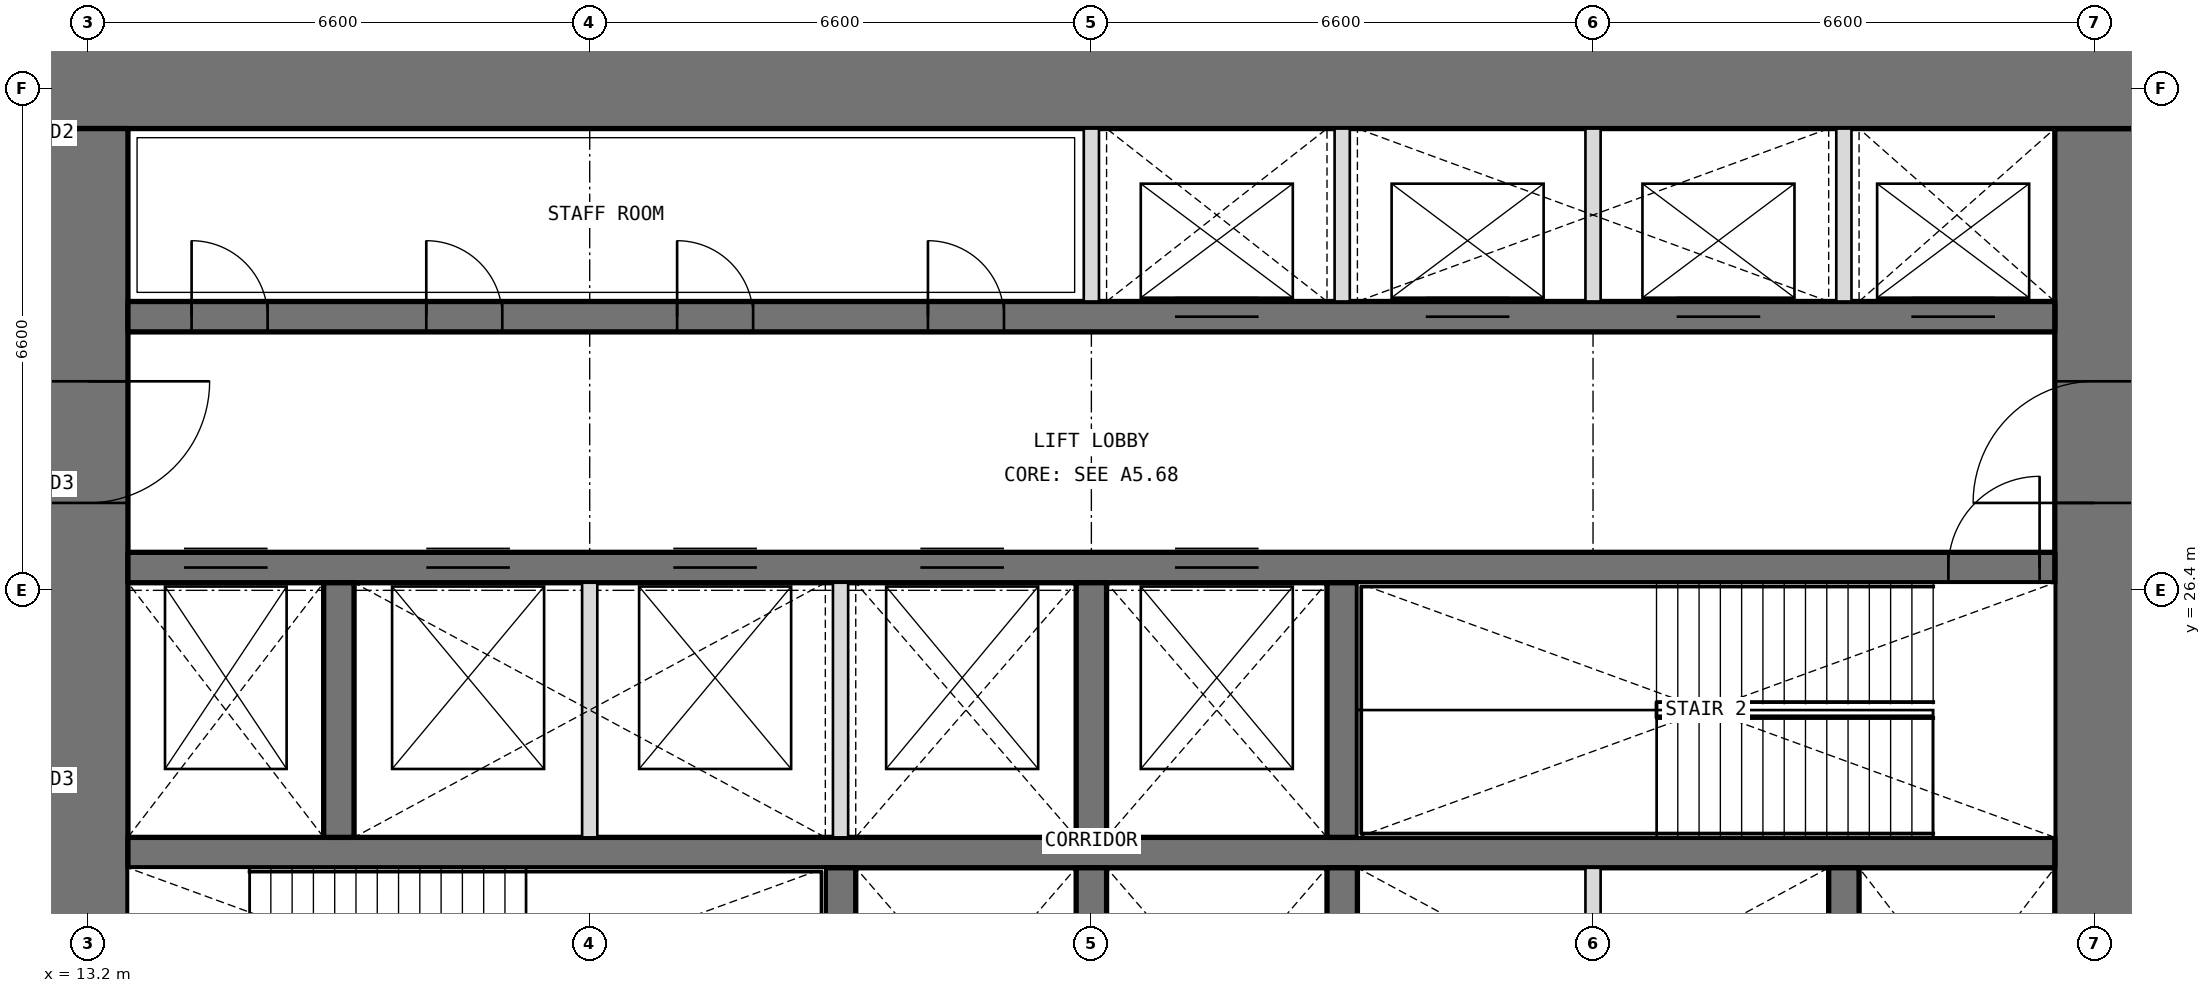
"""IFC4 building model, lengths in metres.
Left out: names, types, materials, properties, quantities, classifications, styles, units other than length and angle.
Written with IfcOpenShell. Run it as: python <this file> out.ifc"""

import sys

from ifc_helpers import new_model, si_unit, direction, frame, frame_2d, origin, place, context, subcontext, project, spatial, rectangle, extrude, element, fill, save


model = new_model("IFC4")
c1 = context("Model", 3, precision=1e-05, world=origin(), true_north=direction((0.0, 1.0)))
c2 = subcontext(c1, "Body", "Model", "MODEL_VIEW")
j1 = project(units=[si_unit("LENGTHUNIT", "METRE"), si_unit("PLANEANGLEUNIT", "RADIAN")], contexts=[c1])
p1 = place(None, origin())
s1 = spatial("IfcSite", under=j1, at=p1, CompositionType="ELEMENT")
p2 = place(p1, origin())
s2 = spatial("IfcBuilding", under=s1, at=p2, CompositionType="ELEMENT")
p3 = place(p2, frame((0.0, 0.0, 288.0)))
s3 = spatial("IfcBuildingStorey", under=s2, at=p3, CompositionType="ELEMENT", Elevation=288.0)
p4 = place(p3, frame((39.6, 13.725, 0.0), z_axis=(0.0, 0.0, 1.0), x_axis=(0.0, 1.0, 0.0)))
e1 = element("IfcWall", 1, at=p4, inside=s3, PredefinedType="SHEAR", context=c2, shape_type="SweptSolid", body=[
    extrude(rectangle(XDim=18.75, YDim=1.05, at=frame_2d((9.375, 0.0))), origin(), (0.0, 0.0, 1.0), 4.8),
])
p5 = place(p4, frame((3.025, 0.0, 0.0)))
e2 = element("IfcOpeningElement", 2, at=p5, cuts=e1, PredefinedType="OPENING", context=c2, shape_type="SweptSolid", body=[
    extrude(rectangle(XDim=1.6, YDim=2.1, at=frame_2d((0.8, 1.05))), frame((0.0, 0.535, 0.0), z_axis=(0.0, -1.0, 0.0), x_axis=(1.0, 0.0, 0.0)), (0.0, 0.0, 1.0), 1.07),
])
p6 = place(p4, frame((13.825, 0.0, 0.0)))
e3 = element("IfcOpeningElement", 3, at=p6, cuts=e1, PredefinedType="OPENING", context=c2, shape_type="SweptSolid", body=[
    extrude(rectangle(XDim=1.6, YDim=2.1, at=frame_2d((0.8, 1.05))), frame((0.0, 0.535, 0.0), z_axis=(0.0, -1.0, 0.0), x_axis=(1.0, 0.0, 0.0)), (0.0, 0.0, 1.0), 1.07),
])
p7 = place(p3, frame((40.125, 33.0, 0.0), z_axis=(0.0, 0.0, 1.0), x_axis=(-1.0, 0.0, 0.0)))
e4 = element("IfcWall", 4, at=p7, inside=s3, PredefinedType="SHEAR", context=c2, shape_type="SweptSolid", body=[
    extrude(rectangle(XDim=27.45, YDim=1.05, at=frame_2d((13.725, 0.0))), origin(), (0.0, 0.0, 1.0), 4.8),
])
p8 = place(p3, frame((13.2, 32.475, 0.0), z_axis=(0.0, 0.0, 1.0), x_axis=(0.0, -1.0, 0.0)))
e5 = element("IfcWall", 5, at=p8, inside=s3, PredefinedType="SHEAR", context=c2, shape_type="SweptSolid", body=[
    extrude(rectangle(XDim=18.75, YDim=1.05, at=frame_2d((9.375, 0.0))), origin(), (0.0, 0.0, 1.0), 4.8),
])
p9 = place(p8, frame((14.125, 0.0, 0.0)))
e6 = element("IfcOpeningElement", 6, at=p9, cuts=e5, PredefinedType="OPENING", context=c2, shape_type="SweptSolid", body=[
    extrude(rectangle(XDim=1.6, YDim=2.1, at=frame_2d((0.8, 1.05))), frame((0.0, 0.535, 0.0), z_axis=(0.0, -1.0, 0.0), x_axis=(1.0, 0.0, 0.0)), (0.0, 0.0, 1.0), 1.07),
])
p10 = place(p8, frame((3.325, 0.0, 0.0)))
e7 = element("IfcOpeningElement", 7, at=p10, cuts=e5, PredefinedType="OPENING", context=c2, shape_type="SweptSolid", body=[
    extrude(rectangle(XDim=1.6, YDim=2.1, at=frame_2d((0.8, 1.05))), frame((0.0, 0.535, 0.0), z_axis=(0.0, -1.0, 0.0), x_axis=(1.0, 0.0, 0.0)), (0.0, 0.0, 1.0), 1.07),
])
p11 = place(p3, frame((13.725, 22.95, 0.0), z_axis=(0.0, 0.0, 1.0), x_axis=(1.0, 0.0, 0.0)))
e8 = element("IfcWall", 8, at=p11, inside=s3, PredefinedType="SHEAR", context=c2, shape_type="SweptSolid", body=[
    extrude(rectangle(XDim=25.35, YDim=0.4, at=frame_2d((12.675, 0.0))), origin(), (0.0, 0.0, 1.0), 4.8),
])
p12 = place(p3, frame((13.725, 26.7, 0.0), z_axis=(0.0, 0.0, 1.0), x_axis=(1.0, 0.0, 0.0)))
e9 = element("IfcWall", 9, at=p12, inside=s3, PredefinedType="SHEAR", context=c2, shape_type="SweptSolid", body=[
    extrude(rectangle(XDim=25.35, YDim=0.4, at=frame_2d((12.675, 0.0))), origin(), (0.0, 0.0, 1.0), 4.8),
])
p13 = place(p12, frame((23.95, 0.0, 0.0)))
e10 = element("IfcOpeningElement", 10, at=p13, cuts=e9, PredefinedType="OPENING", context=c2, shape_type="SweptSolid", body=[
    extrude(rectangle(XDim=1.2, YDim=2.1, at=frame_2d((0.6, 1.05))), frame((0.0, 0.21, 0.0), z_axis=(0.0, -1.0, 0.0), x_axis=(1.0, 0.0, 0.0)), (0.0, 0.0, 1.0), 0.42),
])
p14 = place(p12, frame((0.738, 0.0, 0.0)))
e11 = element("IfcOpeningElement", 11, at=p14, cuts=e9, PredefinedType="OPENING", context=c2, shape_type="SweptSolid", body=[
    extrude(rectangle(XDim=1.1, YDim=2.1, at=frame_2d((0.55, 1.05))), frame((0.0, 0.21, 0.0), z_axis=(0.0, -1.0, 0.0), x_axis=(1.0, 0.0, 0.0)), (0.0, 0.0, 1.0), 0.42),
])
p15 = place(p12, frame((3.925, 0.0, 0.0)))
e12 = element("IfcOpeningElement", 12, at=p15, cuts=e9, PredefinedType="OPENING", context=c2, shape_type="SweptSolid", body=[
    extrude(rectangle(XDim=1.1, YDim=2.1, at=frame_2d((0.55, 1.05))), frame((0.0, 0.21, 0.0), z_axis=(0.0, -1.0, 0.0), x_axis=(1.0, 0.0, 0.0)), (0.0, 0.0, 1.0), 0.42),
])
p16 = place(p12, frame((7.175, 0.0, 0.0)))
e13 = element("IfcOpeningElement", 13, at=p16, cuts=e9, PredefinedType="OPENING", context=c2, shape_type="SweptSolid", body=[
    extrude(rectangle(XDim=1.1, YDim=2.1, at=frame_2d((0.55, 1.05))), frame((0.0, 0.21, 0.0), z_axis=(0.0, -1.0, 0.0), x_axis=(1.0, 0.0, 0.0)), (0.0, 0.0, 1.0), 0.42),
])
p17 = place(p12, frame((10.425, 0.0, 0.0)))
e14 = element("IfcOpeningElement", 14, at=p17, cuts=e9, PredefinedType="OPENING", context=c2, shape_type="SweptSolid", body=[
    extrude(rectangle(XDim=1.1, YDim=2.1, at=frame_2d((0.55, 1.05))), frame((0.0, 0.21, 0.0), z_axis=(0.0, -1.0, 0.0), x_axis=(1.0, 0.0, 0.0)), (0.0, 0.0, 1.0), 0.42),
])
p18 = place(p12, frame((13.775, 0.0, 0.0)))
e15 = element("IfcOpeningElement", 15, at=p18, cuts=e9, PredefinedType="OPENING", context=c2, shape_type="SweptSolid", body=[
    extrude(rectangle(XDim=1.1, YDim=2.1, at=frame_2d((0.55, 1.05))), frame((0.0, 0.21, 0.0), z_axis=(0.0, -1.0, 0.0), x_axis=(1.0, 0.0, 0.0)), (0.0, 0.0, 1.0), 0.42),
])
p19 = place(p3, frame((13.725, 30.0, 0.0), z_axis=(0.0, 0.0, 1.0), x_axis=(1.0, 0.0, 0.0)))
e16 = element("IfcWall", 16, at=p19, inside=s3, PredefinedType="SHEAR", context=c2, shape_type="SweptSolid", body=[
    extrude(rectangle(XDim=25.35, YDim=0.4, at=frame_2d((12.675, 0.0))), origin(), (0.0, 0.0, 1.0), 4.8),
])
p20 = place(p19, frame((0.837, 0.0, 0.0)))
e17 = element("IfcOpeningElement", 17, at=p20, cuts=e16, PredefinedType="OPENING", context=c2, shape_type="SweptSolid", body=[
    extrude(rectangle(XDim=1.0, YDim=2.1, at=frame_2d((0.5, 1.05))), frame((0.0, 0.21, 0.0), z_axis=(0.0, -1.0, 0.0), x_axis=(1.0, 0.0, 0.0)), (0.0, 0.0, 1.0), 0.42),
])
p21 = place(p19, frame((3.925, 0.0, 0.0)))
e18 = element("IfcOpeningElement", 18, at=p21, cuts=e16, PredefinedType="OPENING", context=c2, shape_type="SweptSolid", body=[
    extrude(rectangle(XDim=1.0, YDim=2.1, at=frame_2d((0.5, 1.05))), frame((0.0, 0.21, 0.0), z_axis=(0.0, -1.0, 0.0), x_axis=(1.0, 0.0, 0.0)), (0.0, 0.0, 1.0), 0.42),
])
p22 = place(p19, frame((7.225, 0.0, 0.0)))
e19 = element("IfcOpeningElement", 19, at=p22, cuts=e16, PredefinedType="OPENING", context=c2, shape_type="SweptSolid", body=[
    extrude(rectangle(XDim=1.0, YDim=2.1, at=frame_2d((0.5, 1.05))), frame((0.0, 0.21, 0.0), z_axis=(0.0, -1.0, 0.0), x_axis=(1.0, 0.0, 0.0)), (0.0, 0.0, 1.0), 0.42),
])
p23 = place(p19, frame((10.525, 0.0, 0.0)))
e20 = element("IfcOpeningElement", 20, at=p23, cuts=e16, PredefinedType="OPENING", context=c2, shape_type="SweptSolid", body=[
    extrude(rectangle(XDim=1.0, YDim=2.1, at=frame_2d((0.5, 1.05))), frame((0.0, 0.21, 0.0), z_axis=(0.0, -1.0, 0.0), x_axis=(1.0, 0.0, 0.0)), (0.0, 0.0, 1.0), 0.42),
])
p24 = place(p19, frame((13.775, 0.0, 0.0)))
e21 = element("IfcOpeningElement", 21, at=p24, cuts=e16, PredefinedType="OPENING", context=c2, shape_type="SweptSolid", body=[
    extrude(rectangle(XDim=1.1, YDim=2.1, at=frame_2d((0.55, 1.05))), frame((0.0, 0.21, 0.0), z_axis=(0.0, -1.0, 0.0), x_axis=(1.0, 0.0, 0.0)), (0.0, 0.0, 1.0), 0.42),
])
p25 = place(p19, frame((17.075, 0.0, 0.0)))
e22 = element("IfcOpeningElement", 22, at=p25, cuts=e16, PredefinedType="OPENING", context=c2, shape_type="SweptSolid", body=[
    extrude(rectangle(XDim=1.1, YDim=2.1, at=frame_2d((0.55, 1.05))), frame((0.0, 0.21, 0.0), z_axis=(0.0, -1.0, 0.0), x_axis=(1.0, 0.0, 0.0)), (0.0, 0.0, 1.0), 0.42),
])
p26 = place(p19, frame((20.375, 0.0, 0.0)))
e23 = element("IfcOpeningElement", 23, at=p26, cuts=e16, PredefinedType="OPENING", context=c2, shape_type="SweptSolid", body=[
    extrude(rectangle(XDim=1.1, YDim=2.1, at=frame_2d((0.55, 1.05))), frame((0.0, 0.21, 0.0), z_axis=(0.0, -1.0, 0.0), x_axis=(1.0, 0.0, 0.0)), (0.0, 0.0, 1.0), 0.42),
])
p27 = place(p19, frame((23.462, 0.0, 0.0)))
e24 = element("IfcOpeningElement", 24, at=p27, cuts=e16, PredefinedType="OPENING", context=c2, shape_type="SweptSolid", body=[
    extrude(rectangle(XDim=1.1, YDim=2.1, at=frame_2d((0.55, 1.05))), frame((0.0, 0.21, 0.0), z_axis=(0.0, -1.0, 0.0), x_axis=(1.0, 0.0, 0.0)), (0.0, 0.0, 1.0), 0.42),
])
for number, where, z_axis, x_axis in (
    (25, (23.1, 19.4, 0.0), (0.0, 0.0, 1.0), (0.0, 1.0, 0.0)),
    (26, (26.4, 19.4, 0.0), (0.0, 0.0, 1.0), (0.0, 1.0, 0.0)),
    (27, (29.7, 19.4, 0.0), (0.0, 0.0, 1.0), (0.0, 1.0, 0.0)),
    (28, (36.3, 19.4, 0.0), (0.0, 0.0, 1.0), (0.0, 1.0, 0.0)),
    (29, (16.5, 23.15, 0.0), (0.0, 0.0, 1.0), (0.0, 1.0, 0.0)),
    (30, (26.4, 23.15, 0.0), (0.0, 0.0, 1.0), (0.0, 1.0, 0.0)),
    (31, (29.7, 23.15, 0.0), (0.0, 0.0, 1.0), (0.0, 1.0, 0.0)),
):
    element("IfcWall", number, at=place(p3, frame(where, z_axis=z_axis, x_axis=x_axis)), inside=s3, PredefinedType="SHEAR", context=c2, shape_type="SweptSolid", body=[
        extrude(rectangle(XDim=3.35, YDim=0.4, at=frame_2d((1.675, 0.0))), origin(), (0.0, 0.0, 1.0), 4.8),
    ])
for number, where, z_axis, x_axis in (
    (32, (26.4, 30.2, 0.0), (0.0, 0.0, 1.0), (0.0, 1.0, 0.0)),
    (33, (29.7, 30.2, 0.0), (0.0, 0.0, 1.0), (0.0, 1.0, 0.0)),
    (34, (33.0, 30.2, 0.0), (0.0, 0.0, 1.0), (0.0, 1.0, 0.0)),
    (35, (36.3, 30.2, 0.0), (0.0, 0.0, 1.0), (0.0, 1.0, 0.0)),
):
    element("IfcWall", number, at=place(p3, frame(where, z_axis=z_axis, x_axis=x_axis)), inside=s3, PredefinedType="PARTITIONING", context=c2, shape_type="SweptSolid", body=[
        extrude(rectangle(XDim=2.275, YDim=0.2, at=frame_2d((1.138, 0.0))), origin(), (0.0, 0.0, 1.0), 4.8),
    ])
for number, where, z_axis, x_axis in (
    (36, (33.0, 19.4, 0.0), (0.0, 0.0, 1.0), (0.0, 1.0, 0.0)),
    (37, (19.8, 23.15, 0.0), (0.0, 0.0, 1.0), (0.0, 1.0, 0.0)),
    (38, (23.1, 23.15, 0.0), (0.0, 0.0, 1.0), (0.0, 1.0, 0.0)),
):
    element("IfcWall", number, at=place(p3, frame(where, z_axis=z_axis, x_axis=x_axis)), inside=s3, PredefinedType="PARTITIONING", context=c2, shape_type="SweptSolid", body=[
        extrude(rectangle(XDim=3.35, YDim=0.2, at=frame_2d((1.675, 0.0))), origin(), (0.0, 0.0, 1.0), 4.8),
    ])
p28 = place(p20, origin())
e39 = element("IfcDoor", 39, at=p28, inside=s3, OperationType="SINGLE_SWING_LEFT", PredefinedType="DOOR", context=c2, shape_type="SweptSolid", body=[
    extrude(rectangle(XDim=1.0, YDim=2.1, at=frame_2d((0.5, 1.05))), frame((0.0, 0.025, 0.0), z_axis=(0.0, -1.0, 0.0), x_axis=(1.0, 0.0, 0.0)), (0.0, 0.0, 1.0), 0.05),
])
fill(e17, e39)
p29 = place(p21, origin())
e40 = element("IfcDoor", 40, at=p29, inside=s3, OperationType="SINGLE_SWING_LEFT", PredefinedType="DOOR", context=c2, shape_type="SweptSolid", body=[
    extrude(rectangle(XDim=1.0, YDim=2.1, at=frame_2d((0.5, 1.05))), frame((0.0, 0.025, 0.0), z_axis=(0.0, -1.0, 0.0), x_axis=(1.0, 0.0, 0.0)), (0.0, 0.0, 1.0), 0.05),
])
fill(e18, e40)
p30 = place(p22, origin())
e41 = element("IfcDoor", 41, at=p30, inside=s3, OperationType="SINGLE_SWING_LEFT", PredefinedType="DOOR", context=c2, shape_type="SweptSolid", body=[
    extrude(rectangle(XDim=1.0, YDim=2.1, at=frame_2d((0.5, 1.05))), frame((0.0, 0.025, 0.0), z_axis=(0.0, -1.0, 0.0), x_axis=(1.0, 0.0, 0.0)), (0.0, 0.0, 1.0), 0.05),
])
fill(e19, e41)
p31 = place(p23, origin())
e42 = element("IfcDoor", 42, at=p31, inside=s3, OperationType="SINGLE_SWING_LEFT", PredefinedType="DOOR", context=c2, shape_type="SweptSolid", body=[
    extrude(rectangle(XDim=1.0, YDim=2.1, at=frame_2d((0.5, 1.05))), frame((0.0, 0.025, 0.0), z_axis=(0.0, -1.0, 0.0), x_axis=(1.0, 0.0, 0.0)), (0.0, 0.0, 1.0), 0.05),
])
fill(e20, e42)
p32 = place(p13, origin())
e43 = element("IfcDoor", 43, at=p32, inside=s3, OperationType="SINGLE_SWING_RIGHT", PredefinedType="DOOR", context=c2, shape_type="SweptSolid", body=[
    extrude(rectangle(XDim=1.2, YDim=2.1, at=frame_2d((0.6, 1.05))), frame((0.0, 0.025, 0.0), z_axis=(0.0, -1.0, 0.0), x_axis=(1.0, 0.0, 0.0)), (0.0, 0.0, 1.0), 0.05),
])
fill(e10, e43)
p33 = place(p10, origin())
e44 = element("IfcDoor", 44, at=p33, inside=s3, OperationType="DOUBLE_DOOR_DOUBLE_SWING", PredefinedType="DOOR", context=c2, shape_type="SweptSolid", body=[
    extrude(rectangle(XDim=1.6, YDim=2.1, at=frame_2d((0.8, 1.05))), frame((0.0, 0.025, 0.0), z_axis=(0.0, -1.0, 0.0), x_axis=(1.0, 0.0, 0.0)), (0.0, 0.0, 1.0), 0.05),
])
fill(e7, e44)
p34 = place(p6, origin())
e45 = element("IfcDoor", 45, at=p34, inside=s3, OperationType="DOUBLE_DOOR_DOUBLE_SWING", PredefinedType="DOOR", context=c2, shape_type="SweptSolid", body=[
    extrude(rectangle(XDim=1.6, YDim=2.1, at=frame_2d((0.8, 1.05))), frame((0.0, 0.025, 0.0), z_axis=(0.0, -1.0, 0.0), x_axis=(1.0, 0.0, 0.0)), (0.0, 0.0, 1.0), 0.05),
])
fill(e3, e45)
p35 = place(p24, origin())
e46 = element("IfcDoor", 46, at=p35, inside=s3, OperationType="DOUBLE_DOOR_SLIDING", PredefinedType="DOOR", context=c2, shape_type="SweptSolid", body=[
    extrude(rectangle(XDim=1.1, YDim=2.1, at=frame_2d((0.55, 1.05))), frame((0.0, 0.025, 0.0), z_axis=(0.0, -1.0, 0.0), x_axis=(1.0, 0.0, 0.0)), (0.0, 0.0, 1.0), 0.05),
])
fill(e21, e46)
p36 = place(p25, origin())
e47 = element("IfcDoor", 47, at=p36, inside=s3, OperationType="DOUBLE_DOOR_SLIDING", PredefinedType="DOOR", context=c2, shape_type="SweptSolid", body=[
    extrude(rectangle(XDim=1.1, YDim=2.1, at=frame_2d((0.55, 1.05))), frame((0.0, 0.025, 0.0), z_axis=(0.0, -1.0, 0.0), x_axis=(1.0, 0.0, 0.0)), (0.0, 0.0, 1.0), 0.05),
])
fill(e22, e47)
p37 = place(p26, origin())
e48 = element("IfcDoor", 48, at=p37, inside=s3, OperationType="DOUBLE_DOOR_SLIDING", PredefinedType="DOOR", context=c2, shape_type="SweptSolid", body=[
    extrude(rectangle(XDim=1.1, YDim=2.1, at=frame_2d((0.55, 1.05))), frame((0.0, 0.025, 0.0), z_axis=(0.0, -1.0, 0.0), x_axis=(1.0, 0.0, 0.0)), (0.0, 0.0, 1.0), 0.05),
])
fill(e23, e48)
p38 = place(p27, origin())
e49 = element("IfcDoor", 49, at=p38, inside=s3, OperationType="DOUBLE_DOOR_SLIDING", PredefinedType="DOOR", context=c2, shape_type="SweptSolid", body=[
    extrude(rectangle(XDim=1.1, YDim=2.1, at=frame_2d((0.55, 1.05))), frame((0.0, 0.025, 0.0), z_axis=(0.0, -1.0, 0.0), x_axis=(1.0, 0.0, 0.0)), (0.0, 0.0, 1.0), 0.05),
])
fill(e24, e49)
p39 = place(p14, origin())
e50 = element("IfcDoor", 50, at=p39, inside=s3, OperationType="DOUBLE_DOOR_SLIDING", PredefinedType="DOOR", context=c2, shape_type="SweptSolid", body=[
    extrude(rectangle(XDim=1.1, YDim=2.1, at=frame_2d((0.55, 1.05))), frame((0.0, 0.025, 0.0), z_axis=(0.0, -1.0, 0.0), x_axis=(1.0, 0.0, 0.0)), (0.0, 0.0, 1.0), 0.05),
])
fill(e11, e50)
p40 = place(p15, origin())
e51 = element("IfcDoor", 51, at=p40, inside=s3, OperationType="DOUBLE_DOOR_SLIDING", PredefinedType="DOOR", context=c2, shape_type="SweptSolid", body=[
    extrude(rectangle(XDim=1.1, YDim=2.1, at=frame_2d((0.55, 1.05))), frame((0.0, 0.025, 0.0), z_axis=(0.0, -1.0, 0.0), x_axis=(1.0, 0.0, 0.0)), (0.0, 0.0, 1.0), 0.05),
])
fill(e12, e51)
p41 = place(p16, origin())
e52 = element("IfcDoor", 52, at=p41, inside=s3, OperationType="DOUBLE_DOOR_SLIDING", PredefinedType="DOOR", context=c2, shape_type="SweptSolid", body=[
    extrude(rectangle(XDim=1.1, YDim=2.1, at=frame_2d((0.55, 1.05))), frame((0.0, 0.025, 0.0), z_axis=(0.0, -1.0, 0.0), x_axis=(1.0, 0.0, 0.0)), (0.0, 0.0, 1.0), 0.05),
])
fill(e13, e52)
p42 = place(p17, origin())
e53 = element("IfcDoor", 53, at=p42, inside=s3, OperationType="DOUBLE_DOOR_SLIDING", PredefinedType="DOOR", context=c2, shape_type="SweptSolid", body=[
    extrude(rectangle(XDim=1.1, YDim=2.1, at=frame_2d((0.55, 1.05))), frame((0.0, 0.025, 0.0), z_axis=(0.0, -1.0, 0.0), x_axis=(1.0, 0.0, 0.0)), (0.0, 0.0, 1.0), 0.05),
])
fill(e14, e53)
p43 = place(p18, origin())
e54 = element("IfcDoor", 54, at=p43, inside=s3, OperationType="DOUBLE_DOOR_SLIDING", PredefinedType="DOOR", context=c2, shape_type="SweptSolid", body=[
    extrude(rectangle(XDim=1.1, YDim=2.1, at=frame_2d((0.55, 1.05))), frame((0.0, 0.025, 0.0), z_axis=(0.0, -1.0, 0.0), x_axis=(1.0, 0.0, 0.0)), (0.0, 0.0, 1.0), 0.05),
])
fill(e15, e54)
save(model, sys.argv[1])
